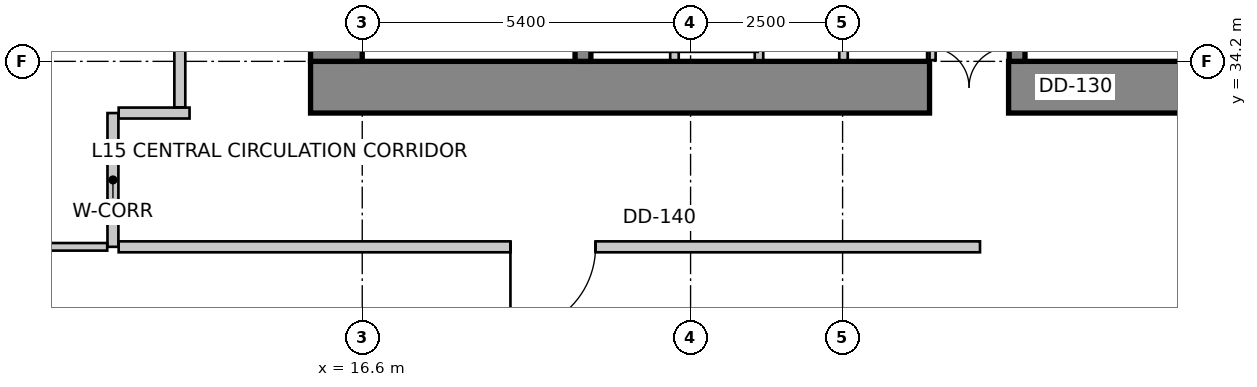
"""IFC4 building model, lengths in metres.
Left out: names, types, materials, properties, quantities, classifications, styles, units other than length and angle.
Written with IfcOpenShell. Run it as: python <this file> out.ifc"""

import sys

from ifc_helpers import new_model, si_unit, direction, frame, frame_2d, origin, place, context, subcontext, project, spatial, rectangle, extrude, source, transform, mapped, element, fill, save


model = new_model("IFC4")
c1 = context("Model", 3, precision=1e-05, world=origin(), true_north=direction((0.0, 1.0)))
c2 = subcontext(c1, "Body", "Model", "MODEL_VIEW")
j1 = project(units=[si_unit("LENGTHUNIT", "METRE"), si_unit("PLANEANGLEUNIT", "RADIAN")], contexts=[c1])
p1 = place(None, origin())
s1 = spatial("IfcSite", under=j1, at=p1, CompositionType="ELEMENT")
p2 = place(p1, origin())
s2 = spatial("IfcBuilding", under=s1, at=p2, CompositionType="ELEMENT")
p3 = place(p2, frame((0.0, 0.0, 63.0)))
s3 = spatial("IfcBuildingStorey", under=s2, at=p3, CompositionType="ELEMENT", Elevation=63.0)
p4 = place(p3, frame((15.75, 33.775, 0.0), z_axis=(0.0, 0.0, 1.0), x_axis=(1.0, 0.0, 0.0)))
e1 = element("IfcWall", 1, at=p4, inside=s3, PredefinedType="SHEAR", context=c2, shape_type="SweptSolid", body=[
    extrude(rectangle(XDim=16.1, YDim=0.85, at=frame_2d((8.05, 0.0))), origin(), (0.0, 0.0, 1.0), 4.0),
])
m1 = source(origin(), c2, "Body", "SweptSolid", [
    extrude(rectangle(XDim=1.3, YDim=2.15, at=frame_2d((0.65, 1.075))), frame((0.0, 0.435, 0.0), z_axis=(0.0, -1.0, 0.0), x_axis=(1.0, 0.0, 0.0)), (0.0, 0.0, 1.0), 0.87),
])
p5 = place(p4, frame((10.18, 0.0, 0.0)))
e2 = element("IfcOpeningElement", 2, at=p5, cuts=e1, PredefinedType="OPENING", context=c2, shape_type="MappedRepresentation", body=[
    mapped(m1, transform((0.0, 0.0, 0.0), scale=1.0)),
])
p6 = place(p3, frame((16.175, 34.2, 0.0), z_axis=(0.0, 0.0, 1.0), x_axis=(0.0, 1.0, 0.0)))
e3 = element("IfcWall", 3, at=p6, inside=s3, PredefinedType="SHEAR", context=c2, shape_type="SweptSolid", body=[
    extrude(rectangle(XDim=11.4, YDim=0.85, at=frame_2d((5.7, 0.0))), origin(), (0.0, 0.0, 1.0), 4.0),
])
m2 = source(origin(), c2, "Body", "SweptSolid", [
    extrude(rectangle(XDim=1.1, YDim=2.15, at=frame_2d((0.55, 1.075))), frame((0.0, 0.435, 0.0), z_axis=(0.0, -1.0, 0.0), x_axis=(1.0, 0.0, 0.0)), (0.0, 0.0, 1.0), 0.87),
])
p7 = place(p6, frame((7.15, 0.0, 0.0)))
e4 = element("IfcOpeningElement", 4, at=p7, cuts=e3, PredefinedType="OPENING", context=c2, shape_type="MappedRepresentation", body=[
    mapped(m2, transform((0.0, 0.0, 0.0), scale=1.0)),
])
p8 = place(p3, frame((20.23, 34.2, 0.0), z_axis=(0.0, 0.0, 1.0), x_axis=(0.0, 1.0, 0.0)))
e5 = element("IfcWall", 5, at=p8, inside=s3, PredefinedType="SHEAR", context=c2, shape_type="SweptSolid", body=[
    extrude(rectangle(XDim=9.06, YDim=0.26, at=frame_2d((4.53, 0.0))), origin(), (0.0, 0.0, 1.0), 4.0),
])
m3 = source(origin(), c2, "Body", "SweptSolid", [
    extrude(rectangle(XDim=1.1, YDim=2.15, at=frame_2d((0.55, 1.075))), frame((0.0, 0.14, 0.0), z_axis=(0.0, -1.0, 0.0), x_axis=(1.0, 0.0, 0.0)), (0.0, 0.0, 1.0), 0.28),
])
p9 = place(p8, frame((7.45, 0.0, 0.0)))
e6 = element("IfcOpeningElement", 6, at=p9, cuts=e5, PredefinedType="OPENING", context=c2, shape_type="MappedRepresentation", body=[
    mapped(m3, transform((0.0, 0.0, 0.0), scale=1.0)),
])
p10 = place(p3, frame((27.37, 34.2, 0.0), z_axis=(0.0, 0.0, 1.0), x_axis=(0.0, 1.0, 0.0)))
e7 = element("IfcWall", 7, at=p10, inside=s3, PredefinedType="SHEAR", context=c2, shape_type="SweptSolid", body=[
    extrude(rectangle(XDim=9.06, YDim=0.26, at=frame_2d((4.53, 0.0))), origin(), (0.0, 0.0, 1.0), 4.0),
])
p11 = place(p10, frame((7.45, 0.0, 0.0)))
e8 = element("IfcOpeningElement", 8, at=p11, cuts=e7, PredefinedType="OPENING", context=c2, shape_type="MappedRepresentation", body=[
    mapped(m3, transform((0.0, 0.0, 0.0), scale=1.0)),
])
p12 = place(p3, frame((13.269, 47.134, 0.0), z_axis=(0.0, 0.0, 1.0), x_axis=(-0.319920423265, -0.947444416722, 0.0)))
e9 = element("IfcWall", 9, at=p12, inside=s3, PredefinedType="SOLIDWALL", context=c2, shape_type="SweptSolid", body=[
    extrude(rectangle(XDim=16.135, YDim=0.3, at=frame_2d((8.067, 0.0))), origin(), (0.0, 0.0, 1.0), 3.75),
])
m4 = source(origin(), c2, "Body", "SweptSolid", [
    extrude(rectangle(XDim=2.4, YDim=2.2, at=frame_2d((1.2, 1.1))), frame((0.0, 0.16, 0.0), z_axis=(0.0, -1.0, 0.0), x_axis=(1.0, 0.0, 0.0)), (0.0, 0.0, 1.0), 0.32),
])
p13 = place(p12, frame((2.188, 0.0, 0.85)))
e10 = element("IfcOpeningElement", 10, at=p13, cuts=e9, PredefinedType="OPENING", context=c2, shape_type="MappedRepresentation", body=[
    mapped(m4, transform((0.0, 0.0, 0.0), scale=1.0)),
])
m5 = source(origin(), c2, "Body", "SweptSolid", [
    extrude(rectangle(XDim=2.8, YDim=2.4, at=frame_2d((1.4, 1.2))), frame((0.0, 0.16, 0.0), z_axis=(0.0, -1.0, 0.0), x_axis=(1.0, 0.0, 0.0)), (0.0, 0.0, 1.0), 0.32),
])
p14 = place(p12, frame((6.959, 0.0, 0.85)))
e11 = element("IfcOpeningElement", 11, at=p14, cuts=e9, PredefinedType="OPENING", context=c2, shape_type="MappedRepresentation", body=[
    mapped(m5, transform((0.0, 0.0, 0.0), scale=1.0)),
])
p15 = place(p12, frame((12.13, 0.0, 0.85)))
e12 = element("IfcOpeningElement", 12, at=p15, cuts=e9, PredefinedType="OPENING", context=c2, shape_type="MappedRepresentation", body=[
    mapped(m4, transform((0.0, 0.0, 0.0), scale=1.0)),
])
p16 = place(p3, frame((8.183, 31.833, 0.0), z_axis=(0.0, 0.0, 1.0), x_axis=(0.18216364648, -0.983268226834, 0.0)))
e13 = element("IfcWall", 13, at=p16, inside=s3, PredefinedType="SOLIDWALL", context=c2, shape_type="SweptSolid", body=[
    extrude(rectangle(XDim=26.678, YDim=0.3, at=frame_2d((13.339, 0.0))), origin(), (0.0, 0.0, 1.0), 3.75),
])
m6 = source(origin(), c2, "Body", "SweptSolid", [
    extrude(rectangle(XDim=1.6, YDim=2.15, at=frame_2d((0.8, 1.075))), frame((0.0, 0.16, 0.0), z_axis=(0.0, -1.0, 0.0), x_axis=(1.0, 0.0, 0.0)), (0.0, 0.0, 1.0), 0.32),
])
p17 = place(p16, frame((9.427, 0.0, 0.0)))
e14 = element("IfcOpeningElement", 14, at=p17, cuts=e13, PredefinedType="OPENING", context=c2, shape_type="MappedRepresentation", body=[
    mapped(m6, transform((0.0, 0.0, 0.0), scale=1.0)),
])
p18 = place(p16, frame((3.642, 0.0, 0.85)))
e15 = element("IfcOpeningElement", 15, at=p18, cuts=e13, PredefinedType="OPENING", context=c2, shape_type="MappedRepresentation", body=[
    mapped(m5, transform((0.0, 0.0, 0.0), scale=1.0)),
])
p19 = place(p16, frame((13.647, 0.0, 0.85)))
e16 = element("IfcOpeningElement", 16, at=p19, cuts=e13, PredefinedType="OPENING", context=c2, shape_type="MappedRepresentation", body=[
    mapped(m5, transform((0.0, 0.0, 0.0), scale=1.0)),
])
p20 = place(p16, frame((18.372, 0.0, 0.85)))
e17 = element("IfcOpeningElement", 17, at=p20, cuts=e13, PredefinedType="OPENING", context=c2, shape_type="MappedRepresentation", body=[
    mapped(m4, transform((0.0, 0.0, 0.0), scale=1.0)),
])
p21 = place(p16, frame((22.696, 0.0, 0.85)))
e18 = element("IfcOpeningElement", 18, at=p21, cuts=e13, PredefinedType="OPENING", context=c2, shape_type="MappedRepresentation", body=[
    mapped(m5, transform((0.0, 0.0, 0.0), scale=1.0)),
])
for number, where, z_axis, x_axis in (
    (19, (25.96, 34.22, 0.0), (0.0, 0.0, 1.0), (0.0, 1.0, 0.0)),
    (20, (21.735, 34.22, 0.0), (0.0, 0.0, 1.0), (0.0, 1.0, 0.0)),
    (21, (23.125, 34.22, 0.0), (0.0, 0.0, 1.0), (0.0, 1.0, 0.0)),
    (22, (24.515, 34.22, 0.0), (0.0, 0.0, 1.0), (0.0, 1.0, 0.0)),
):
    element("IfcWall", number, at=place(p3, frame(where, z_axis=z_axis, x_axis=x_axis)), inside=s3, PredefinedType="SOLIDWALL", context=c2, shape_type="SweptSolid", body=[
        extrude(rectangle(XDim=1.62, YDim=0.14, at=frame_2d((0.81, 0.0))), origin(), (0.0, 0.0, 1.0), 3.042),
    ])
p22 = place(p3, frame((12.5, 31.15, 0.0), z_axis=(0.0, 0.0, 1.0), x_axis=(0.0, 1.0, 0.0)))
e23 = element("IfcWall", 23, at=p22, inside=s3, PredefinedType="PARTITIONING", context=c2, shape_type="SweptSolid", body=[
    extrude(rectangle(XDim=2.2, YDim=0.18, at=frame_2d((1.1, 0.0))), origin(), (0.0, 0.0, 1.0), 3.335),
])
p23 = place(p3, frame((12.594, 33.35, 0.0), z_axis=(0.0, 0.0, 1.0), x_axis=(1.0, 0.0, 0.0)))
e24 = element("IfcWall", 24, at=p23, inside=s3, PredefinedType="PARTITIONING", context=c2, shape_type="SweptSolid", body=[
    extrude(rectangle(XDim=1.166, YDim=0.18, at=frame_2d((0.583, 0.0))), origin(), (0.0, 0.0, 1.0), 3.75),
])
p24 = place(p3, frame((26.76, 31.15, 0.0), z_axis=(0.0, 0.0, 1.0), x_axis=(-1.0, 0.0, 0.0)))
e25 = element("IfcWall", 25, at=p24, inside=s3, PredefinedType="PARTITIONING", context=c2, shape_type="SweptSolid", body=[
    extrude(rectangle(XDim=14.166, YDim=0.18, at=frame_2d((7.083, 0.0))), origin(), (0.0, 0.0, 1.0), 3.335),
])
m7 = source(origin(), c2, "Body", "SweptSolid", [
    extrude(rectangle(XDim=1.4, YDim=2.15, at=frame_2d((0.7, 1.075))), frame((0.0, 0.1, 0.0), z_axis=(0.0, -1.0, 0.0), x_axis=(1.0, 0.0, 0.0)), (0.0, 0.0, 1.0), 0.2),
])
p25 = place(p24, frame((6.323, 0.0, 0.0)))
e26 = element("IfcOpeningElement", 26, at=p25, cuts=e25, PredefinedType="OPENING", context=c2, shape_type="MappedRepresentation", body=[
    mapped(m7, transform((0.0, 0.0, 0.0), scale=1.0)),
])
p26 = place(p3, frame((13.6, 33.444, 0.0), z_axis=(0.0, 0.0, 1.0), x_axis=(0.0, 1.0, 0.0)))
e27 = element("IfcWall", 27, at=p26, inside=s3, PredefinedType="PARTITIONING", context=c2, shape_type="SweptSolid", body=[
    extrude(rectangle(XDim=13.896, YDim=0.18, at=frame_2d((6.948, 0.0))), origin(), (0.0, 0.0, 1.0), 2.892),
])
m8 = source(origin(), c2, "Body", "SweptSolid", [
    extrude(rectangle(XDim=0.9, YDim=2.15, at=frame_2d((0.45, 1.075))), frame((0.0, 0.1, 0.0), z_axis=(0.0, -1.0, 0.0), x_axis=(1.0, 0.0, 0.0)), (0.0, 0.0, 1.0), 0.2),
])
p27 = place(p26, frame((4.144, 0.0, 0.0)))
e28 = element("IfcOpeningElement", 28, at=p27, cuts=e27, PredefinedType="OPENING", context=c2, shape_type="MappedRepresentation", body=[
    mapped(m8, transform((0.0, 0.0, 0.0), scale=1.0)),
])
p28 = place(p3, frame((12.406, 31.15, 0.0), z_axis=(0.0, 0.0, 1.0), x_axis=(-1.0, 0.0, 0.0)))
e29 = element("IfcWall", 29, at=p28, inside=s3, PredefinedType="PARTITIONING", context=c2, shape_type="SweptSolid", body=[
    extrude(rectangle(XDim=3.979, YDim=0.125, at=frame_2d((1.99, 0.0))), origin(), (0.0, 0.0, 1.0), 2.892),
])
m9 = source(origin(), c2, "Body", "SweptSolid", [
    extrude(rectangle(XDim=1.3, YDim=2.15, at=frame_2d((0.65, 1.075))), frame((0.0, 0.025, 0.0), z_axis=(0.0, -1.0, 0.0), x_axis=(1.0, 0.0, 0.0)), (0.0, 0.0, 1.0), 0.05),
])
p29 = place(p5, origin())
e30 = element("IfcDoor", 30, at=p29, inside=s3, OperationType="DOUBLE_DOOR_SINGLE_SWING", PredefinedType="DOOR", context=c2, shape_type="MappedRepresentation", body=[
    mapped(m9, transform((0.0, 0.0, 0.0), scale=1.0)),
])
fill(e2, e30)
m10 = source(origin(), c2, "Body", "SweptSolid", [
    extrude(rectangle(XDim=1.4, YDim=2.15, at=frame_2d((0.7, 1.075))), frame((0.0, 0.025, 0.0), z_axis=(0.0, -1.0, 0.0), x_axis=(1.0, 0.0, 0.0)), (0.0, 0.0, 1.0), 0.05),
])
p30 = place(p25, origin())
e31 = element("IfcDoor", 31, at=p30, inside=s3, OperationType="SINGLE_SWING_RIGHT", PredefinedType="DOOR", context=c2, shape_type="MappedRepresentation", body=[
    mapped(m10, transform((0.0, 0.0, 0.0), scale=1.0)),
])
fill(e26, e31)
save(model, sys.argv[1])
